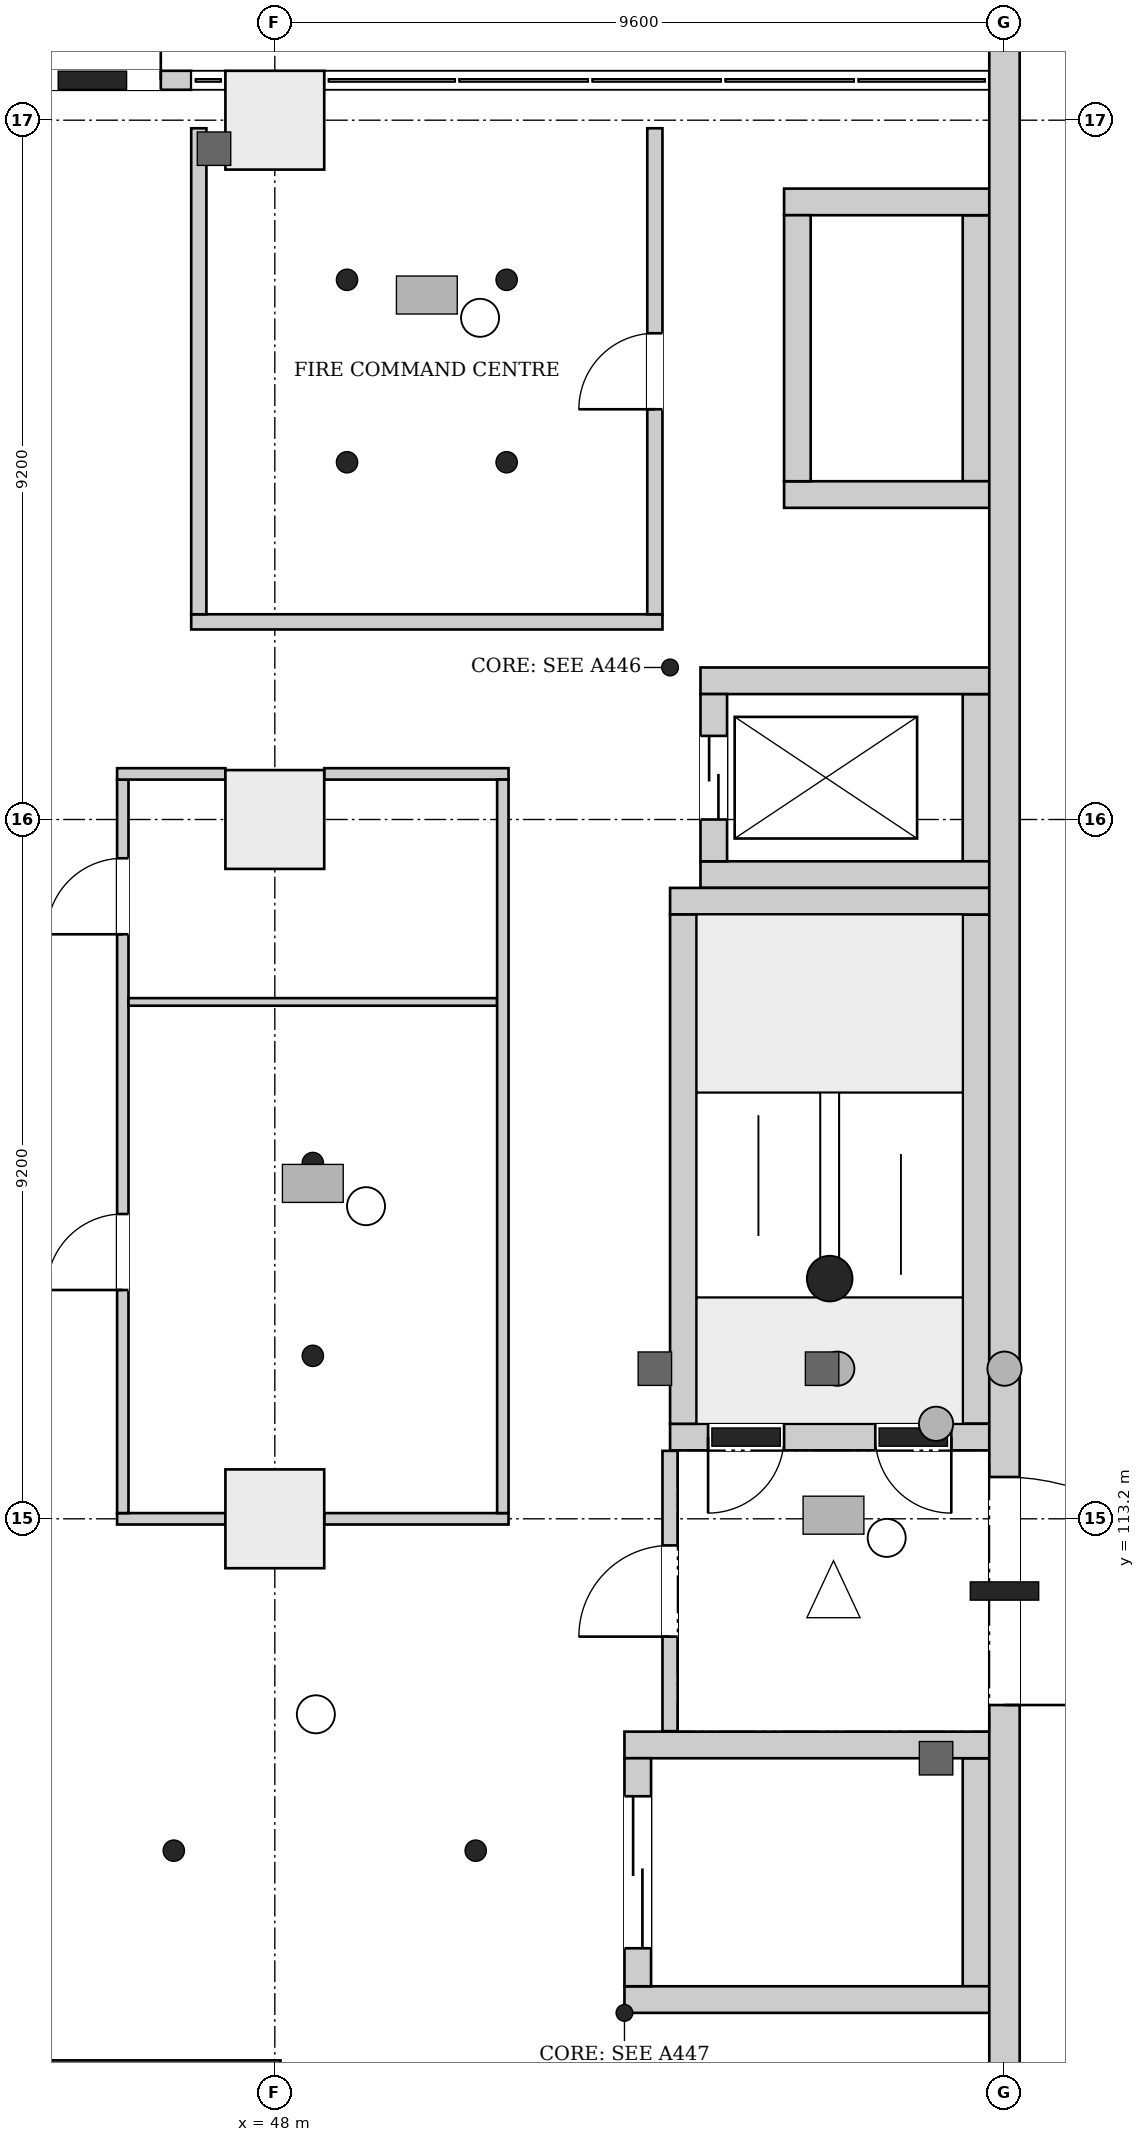
"""IFC4 building model, lengths in metres.
Left out: names, types, materials, properties, quantities, classifications, styles, units other than length and angle.
Written with IfcOpenShell. Run it as: python <this file> out.ifc"""

import sys

from ifc_helpers import new_model, si_unit, direction, frame, frame_2d, origin, origin_2d, place, context, subcontext, project, spatial, rectangle, extrude, element, fill, save


model = new_model("IFC4")
c1 = context("Model", 3, precision=1e-05, world=origin(), true_north=direction((0.0, 1.0)))
c2 = subcontext(c1, "Body", "Model", "MODEL_VIEW")
j1 = project(units=[si_unit("LENGTHUNIT", "METRE"), si_unit("PLANEANGLEUNIT", "RADIAN")], contexts=[c1])
p1 = place(None, origin())
s1 = spatial("IfcSite", under=j1, at=p1, CompositionType="ELEMENT")
p2 = place(p1, origin())
s2 = spatial("IfcBuilding", under=s1, at=p2, CompositionType="ELEMENT")
p3 = place(p2, origin())
s3 = spatial("IfcBuildingStorey", under=s2, at=p3, CompositionType="ELEMENT", Elevation=0.0)
p4 = place(p3, frame((57.6, 94.12, 0.0), z_axis=(0.0, 0.0, 1.0), x_axis=(0.0, 1.0, 0.0)))
e1 = element("IfcWall", 1, at=p4, inside=s3, PredefinedType="SHEAR", context=c2, shape_type="SweptSolid", body=[
    extrude(rectangle(XDim=46.88, YDim=0.4, at=frame_2d((23.44, 0.0))), origin(), (0.0, 0.0, 1.0), 6.5),
])
p5 = place(p4, frame((16.63, 0.0, 0.0)))
e2 = element("IfcOpeningElement", 2, at=p5, cuts=e1, PredefinedType="OPENING", context=c2, shape_type="SweptSolid", body=[
    extrude(rectangle(XDim=3.0, YDim=2.4, at=frame_2d((1.5, 1.2))), frame((0.0, 0.21, 0.0), z_axis=(0.0, -1.0, 0.0), x_axis=(1.0, 0.0, 0.0)), (0.0, 0.0, 1.0), 0.42),
])
p6 = place(p3, frame((53.2, 114.275, 0.0), z_axis=(0.0, 0.0, 1.0), x_axis=(1.0, 0.0, 0.0)))
e3 = element("IfcWall", 3, at=p6, inside=s3, PredefinedType="SHEAR", context=c2, shape_type="SweptSolid", body=[
    extrude(rectangle(XDim=4.2, YDim=0.35, at=frame_2d((2.1, 0.0))), origin(), (0.0, 0.0, 1.0), 6.5),
])
p7 = place(p6, frame((0.5, 0.0, 0.0)))
e4 = element("IfcOpeningElement", 4, at=p7, cuts=e3, PredefinedType="OPENING", context=c2, shape_type="SweptSolid", body=[
    extrude(rectangle(XDim=1.0, YDim=2.1, at=frame_2d((0.5, 1.05))), frame((0.0, 0.185, 0.0), z_axis=(0.0, -1.0, 0.0), x_axis=(1.0, 0.0, 0.0)), (0.0, 0.0, 1.0), 0.37),
])
p8 = place(p6, frame((2.7, 0.0, 0.0)))
e5 = element("IfcOpeningElement", 5, at=p8, cuts=e3, PredefinedType="OPENING", context=c2, shape_type="SweptSolid", body=[
    extrude(rectangle(XDim=1.0, YDim=2.1, at=frame_2d((0.5, 1.05))), frame((0.0, 0.185, 0.0), z_axis=(0.0, -1.0, 0.0), x_axis=(1.0, 0.0, 0.0)), (0.0, 0.0, 1.0), 0.37),
])
p9 = place(p3, frame((53.2, 121.325, 0.0), z_axis=(0.0, 0.0, 1.0), x_axis=(1.0, 0.0, 0.0)))
e6 = element("IfcWall", 6, at=p9, inside=s3, PredefinedType="SHEAR", context=c2, shape_type="SweptSolid", body=[
    extrude(rectangle(XDim=4.2, YDim=0.35, at=frame_2d((2.1, 0.0))), origin(), (0.0, 0.0, 1.0), 6.5),
])
for number, where, z_axis, x_axis in (
    (7, (53.375, 114.45, 0.0), (0.0, 0.0, 1.0), (0.0, 1.0, 0.0)),
    (8, (57.225, 114.45, 0.0), (0.0, 0.0, 1.0), (0.0, 1.0, 0.0)),
):
    element("IfcWall", number, at=place(p3, frame(where, z_axis=z_axis, x_axis=x_axis)), inside=s3, PredefinedType="SHEAR", context=c2, shape_type="SweptSolid", body=[
        extrude(rectangle(XDim=6.7, YDim=0.35, at=frame_2d((3.35, 0.0))), origin(), (0.0, 0.0, 1.0), 6.5),
    ])
for number, where, z_axis, x_axis in (
    (9, (53.6, 121.675, 0.0), (0.0, 0.0, 1.0), (1.0, 0.0, 0.0)),
    (10, (53.6, 124.225, 0.0), (0.0, 0.0, 1.0), (1.0, 0.0, 0.0)),
):
    element("IfcWall", number, at=place(p3, frame(where, z_axis=z_axis, x_axis=x_axis)), inside=s3, PredefinedType="SHEAR", context=c2, shape_type="SweptSolid", body=[
        extrude(rectangle(XDim=3.8, YDim=0.35, at=frame_2d((1.9, 0.0))), origin(), (0.0, 0.0, 1.0), 6.5),
    ])
p10 = place(p3, frame((53.775, 121.85, 0.0), z_axis=(0.0, 0.0, 1.0), x_axis=(0.0, 1.0, 0.0)))
e11 = element("IfcWall", 11, at=p10, inside=s3, PredefinedType="SHEAR", context=c2, shape_type="SweptSolid", body=[
    extrude(rectangle(XDim=2.2, YDim=0.35, at=frame_2d((1.1, 0.0))), origin(), (0.0, 0.0, 1.0), 6.5),
])
p11 = place(p10, frame((0.55, 0.0, 0.0)))
e12 = element("IfcOpeningElement", 12, at=p11, cuts=e11, PredefinedType="OPENING", context=c2, shape_type="SweptSolid", body=[
    extrude(rectangle(XDim=1.1, YDim=2.1, at=frame_2d((0.55, 1.05))), frame((0.0, 0.185, 0.0), z_axis=(0.0, -1.0, 0.0), x_axis=(1.0, 0.0, 0.0)), (0.0, 0.0, 1.0), 0.37),
])
p12 = place(p3, frame((57.225, 121.85, 0.0), z_axis=(0.0, 0.0, 1.0), x_axis=(0.0, 1.0, 0.0)))
e13 = element("IfcWall", 13, at=p12, inside=s3, PredefinedType="SHEAR", context=c2, shape_type="SweptSolid", body=[
    extrude(rectangle(XDim=2.2, YDim=0.35, at=frame_2d((1.1, 0.0))), origin(), (0.0, 0.0, 1.0), 6.5),
])
for number, where, z_axis, x_axis in (
    (14, (52.6, 106.875, 0.0), (0.0, 0.0, 1.0), (1.0, 0.0, 0.0)),
    (15, (52.6, 110.225, 0.0), (0.0, 0.0, 1.0), (1.0, 0.0, 0.0)),
):
    element("IfcWall", number, at=place(p3, frame(where, z_axis=z_axis, x_axis=x_axis)), inside=s3, PredefinedType="SHEAR", context=c2, shape_type="SweptSolid", body=[
        extrude(rectangle(XDim=4.8, YDim=0.35, at=frame_2d((2.4, 0.0))), origin(), (0.0, 0.0, 1.0), 6.5),
    ])
p13 = place(p3, frame((52.775, 107.05, 0.0), z_axis=(0.0, 0.0, 1.0), x_axis=(0.0, 1.0, 0.0)))
e16 = element("IfcWall", 16, at=p13, inside=s3, PredefinedType="SHEAR", context=c2, shape_type="SweptSolid", body=[
    extrude(rectangle(XDim=3.0, YDim=0.35, at=frame_2d((1.5, 0.0))), origin(), (0.0, 0.0, 1.0), 6.5),
])
p14 = place(p13, frame((0.5, 0.0, 0.0)))
e17 = element("IfcOpeningElement", 17, at=p14, cuts=e16, PredefinedType="OPENING", context=c2, shape_type="SweptSolid", body=[
    extrude(rectangle(XDim=2.0, YDim=2.4, at=frame_2d((1.0, 1.2))), frame((0.0, 0.185, 0.0), z_axis=(0.0, -1.0, 0.0), x_axis=(1.0, 0.0, 0.0)), (0.0, 0.0, 1.0), 0.37),
])
p15 = place(p3, frame((57.225, 107.05, 0.0), z_axis=(0.0, 0.0, 1.0), x_axis=(0.0, 1.0, 0.0)))
e18 = element("IfcWall", 18, at=p15, inside=s3, PredefinedType="SHEAR", context=c2, shape_type="SweptSolid", body=[
    extrude(rectangle(XDim=3.0, YDim=0.35, at=frame_2d((1.5, 0.0))), origin(), (0.0, 0.0, 1.0), 6.5),
])
for number, where, z_axis, x_axis in (
    (19, (54.7, 126.675, 0.0), (0.0, 0.0, 1.0), (1.0, 0.0, 0.0)),
    (20, (54.7, 130.525, 0.0), (0.0, 0.0, 1.0), (1.0, 0.0, 0.0)),
):
    element("IfcWall", number, at=place(p3, frame(where, z_axis=z_axis, x_axis=x_axis)), inside=s3, PredefinedType="SHEAR", context=c2, shape_type="SweptSolid", body=[
        extrude(rectangle(XDim=2.7, YDim=0.35, at=frame_2d((1.35, 0.0))), origin(), (0.0, 0.0, 1.0), 6.5),
    ])
for number, where, z_axis, x_axis in (
    (21, (54.875, 126.85, 0.0), (0.0, 0.0, 1.0), (0.0, 1.0, 0.0)),
    (22, (57.225, 126.85, 0.0), (0.0, 0.0, 1.0), (0.0, 1.0, 0.0)),
):
    element("IfcWall", number, at=place(p3, frame(where, z_axis=z_axis, x_axis=x_axis)), inside=s3, PredefinedType="SHEAR", context=c2, shape_type="SweptSolid", body=[
        extrude(rectangle(XDim=3.5, YDim=0.35, at=frame_2d((1.75, 0.0))), origin(), (0.0, 0.0, 1.0), 6.5),
    ])
for number, where, z_axis, x_axis in (
    (23, (48.0, 113.2, 0.0), (0.0, 0.0, 1.0), (1.0, 0.0, 0.0)),
    (24, (48.0, 122.4, 0.0), (0.0, 0.0, 1.0), (1.0, 0.0, 0.0)),
    (25, (48.0, 131.6, 0.0), (0.0, 0.0, 1.0), (1.0, 0.0, 0.0)),
):
    element("IfcColumn", number, at=place(p3, frame(where, z_axis=z_axis, x_axis=x_axis)), inside=s3, PredefinedType="COLUMN", context=c2, shape_type="SweptSolid", body=[
        extrude(rectangle(XDim=1.3, YDim=1.3, at=origin_2d()), origin(), (0.0, 0.0, 1.0), 6.5),
    ])
p16 = place(p3, frame((46.9, 132.125, 0.0), z_axis=(0.0, 0.0, 1.0), x_axis=(-1.0, 0.0, 0.0)))
e26 = element("IfcWall", 26, at=p16, inside=s3, PredefinedType="ELEMENTEDWALL", context=c2, shape_type="SweptSolid", body=[
    extrude(rectangle(XDim=2.6, YDim=0.25, at=frame_2d((1.3, 0.0))), origin(), (0.0, 0.0, 1.0), 5.75),
])
p17 = place(p16, frame((0.4, 0.0, 0.0)))
e27 = element("IfcOpeningElement", 27, at=p17, cuts=e26, PredefinedType="OPENING", context=c2, shape_type="SweptSolid", body=[
    extrude(rectangle(XDim=1.8, YDim=2.4, at=frame_2d((0.9, 1.2))), frame((0.0, 0.135, 0.0), z_axis=(0.0, -1.0, 0.0), x_axis=(1.0, 0.0, 0.0)), (0.0, 0.0, 1.0), 0.27),
])
p18 = place(p3, frame((38.5, 106.0, 0.0), z_axis=(0.0, 0.0, 1.0), x_axis=(1.0, 0.0, 0.0)))
e28 = element("IfcWall", 28, at=p18, inside=s3, PredefinedType="PARTITIONING", context=c2, shape_type="SweptSolid", body=[
    extrude(rectangle(XDim=9.575, YDim=0.15, at=frame_2d((4.788, 0.0))), origin(), (0.0, 0.0, 1.0), 6.15),
])
p19 = place(p3, frame((45.925, 113.2, 0.0), z_axis=(0.0, 0.0, 1.0), x_axis=(1.0, 0.0, 0.0)))
e29 = element("IfcWall", 29, at=p19, inside=s3, PredefinedType="PARTITIONING", context=c2, shape_type="SweptSolid", body=[
    extrude(rectangle(XDim=1.425, YDim=0.15, at=frame_2d((0.712, 0.0))), origin(), (0.0, 0.0, 1.0), 5.75),
])
p20 = place(p3, frame((46.0, 113.275, 0.0), z_axis=(0.0, 0.0, 1.0), x_axis=(0.0, 1.0, 0.0)))
e30 = element("IfcWall", 30, at=p20, inside=s3, PredefinedType="PARTITIONING", context=c2, shape_type="SweptSolid", body=[
    extrude(rectangle(XDim=9.65, YDim=0.15, at=frame_2d((4.825, 0.0))), origin(), (0.0, 0.0, 1.0), 6.15),
])
p21 = place(p20, frame((2.935, 0.0, 0.0)))
e31 = element("IfcOpeningElement", 31, at=p21, cuts=e30, PredefinedType="OPENING", context=c2, shape_type="SweptSolid", body=[
    extrude(rectangle(XDim=1.0, YDim=2.1, at=frame_2d((0.5, 1.05))), frame((0.0, 0.085, 0.0), z_axis=(0.0, -1.0, 0.0), x_axis=(1.0, 0.0, 0.0)), (0.0, 0.0, 1.0), 0.17),
])
p22 = place(p20, frame((7.615, 0.0, 0.0)))
e32 = element("IfcOpeningElement", 32, at=p22, cuts=e30, PredefinedType="OPENING", context=c2, shape_type="SweptSolid", body=[
    extrude(rectangle(XDim=1.0, YDim=2.1, at=frame_2d((0.5, 1.05))), frame((0.0, 0.085, 0.0), z_axis=(0.0, -1.0, 0.0), x_axis=(1.0, 0.0, 0.0)), (0.0, 0.0, 1.0), 0.17),
])
p23 = place(p3, frame((45.925, 123.0, 0.0), z_axis=(0.0, 0.0, 1.0), x_axis=(1.0, 0.0, 0.0)))
e33 = element("IfcWall", 33, at=p23, inside=s3, PredefinedType="PARTITIONING", context=c2, shape_type="SweptSolid", body=[
    extrude(rectangle(XDim=1.425, YDim=0.15, at=frame_2d((0.712, 0.0))), origin(), (0.0, 0.0, 1.0), 5.75),
])
p24 = place(p3, frame((46.075, 120.0, 0.0), z_axis=(0.0, 0.0, 1.0), x_axis=(1.0, 0.0, 0.0)))
e34 = element("IfcWall", 34, at=p24, inside=s3, PredefinedType="PARTITIONING", context=c2, shape_type="SweptSolid", body=[
    extrude(rectangle(XDim=4.85, YDim=0.1, at=frame_2d((2.425, 0.0))), origin(), (0.0, 0.0, 1.0), 6.15),
])
p25 = place(p3, frame((46.9, 125.0, 0.0), z_axis=(0.0, 0.0, 1.0), x_axis=(1.0, 0.0, 0.0)))
e35 = element("IfcWall", 35, at=p25, inside=s3, PredefinedType="PARTITIONING", context=c2, shape_type="SweptSolid", body=[
    extrude(rectangle(XDim=6.2, YDim=0.2, at=frame_2d((3.1, 0.0))), origin(), (0.0, 0.0, 1.0), 6.15),
])
p26 = place(p3, frame((47.0, 125.1, 0.0), z_axis=(0.0, 0.0, 1.0), x_axis=(0.0, 1.0, 0.0)))
e36 = element("IfcWall", 36, at=p26, inside=s3, PredefinedType="PARTITIONING", context=c2, shape_type="SweptSolid", body=[
    extrude(rectangle(XDim=6.394, YDim=0.2, at=frame_2d((3.197, 0.0))), origin(), (0.0, 0.0, 1.0), 6.15),
])
p27 = place(p3, frame((48.65, 113.2, 0.0), z_axis=(0.0, 0.0, 1.0), x_axis=(1.0, 0.0, 0.0)))
e37 = element("IfcWall", 37, at=p27, inside=s3, PredefinedType="PARTITIONING", context=c2, shape_type="SweptSolid", body=[
    extrude(rectangle(XDim=2.425, YDim=0.15, at=frame_2d((1.212, 0.0))), origin(), (0.0, 0.0, 1.0), 5.75),
])
p28 = place(p3, frame((48.65, 123.0, 0.0), z_axis=(0.0, 0.0, 1.0), x_axis=(1.0, 0.0, 0.0)))
e38 = element("IfcWall", 38, at=p28, inside=s3, PredefinedType="PARTITIONING", context=c2, shape_type="SweptSolid", body=[
    extrude(rectangle(XDim=2.425, YDim=0.15, at=frame_2d((1.212, 0.0))), origin(), (0.0, 0.0, 1.0), 6.15),
])
p29 = place(p3, frame((51.0, 113.275, 0.0), z_axis=(0.0, 0.0, 1.0), x_axis=(0.0, 1.0, 0.0)))
e39 = element("IfcWall", 39, at=p29, inside=s3, PredefinedType="PARTITIONING", context=c2, shape_type="SweptSolid", body=[
    extrude(rectangle(XDim=9.65, YDim=0.15, at=frame_2d((4.825, 0.0))), origin(), (0.0, 0.0, 1.0), 6.15),
])
p30 = place(p3, frame((53.0, 125.1, 0.0), z_axis=(0.0, 0.0, 1.0), x_axis=(0.0, 1.0, 0.0)))
e40 = element("IfcWall", 40, at=p30, inside=s3, PredefinedType="PARTITIONING", context=c2, shape_type="SweptSolid", body=[
    extrude(rectangle(XDim=6.394, YDim=0.2, at=frame_2d((3.197, 0.0))), origin(), (0.0, 0.0, 1.0), 6.15),
])
p31 = place(p30, frame((2.697, 0.0, 0.0)))
e41 = element("IfcOpeningElement", 41, at=p31, cuts=e40, PredefinedType="OPENING", context=c2, shape_type="SweptSolid", body=[
    extrude(rectangle(XDim=1.0, YDim=2.1, at=frame_2d((0.5, 1.05))), frame((0.0, 0.11, 0.0), z_axis=(0.0, -1.0, 0.0), x_axis=(1.0, 0.0, 0.0)), (0.0, 0.0, 1.0), 0.22),
])
p32 = place(p3, frame((53.2, 110.406, 0.0), z_axis=(0.0, 0.0, 1.0), x_axis=(0.0, 1.0, 0.0)))
e42 = element("IfcWall", 42, at=p32, inside=s3, PredefinedType="PARTITIONING", context=c2, shape_type="SweptSolid", body=[
    extrude(rectangle(XDim=3.688, YDim=0.2, at=frame_2d((1.844, 0.0))), origin(), (0.0, 0.0, 1.0), 6.15),
])
p33 = place(p32, frame((1.244, 0.0, 0.0)))
e43 = element("IfcOpeningElement", 43, at=p33, cuts=e42, PredefinedType="OPENING", context=c2, shape_type="SweptSolid", body=[
    extrude(rectangle(XDim=1.2, YDim=2.1, at=frame_2d((0.6, 1.05))), frame((0.0, 0.11, 0.0), z_axis=(0.0, -1.0, 0.0), x_axis=(1.0, 0.0, 0.0)), (0.0, 0.0, 1.0), 0.22),
])
p34 = place(p17, frame((1.8, 0.0, 0.0), z_axis=(0.0, 0.0, 1.0), x_axis=(-1.0, 0.0, 0.0)))
e44 = element("IfcDoor", 44, at=p34, inside=s3, OperationType="DOUBLE_DOOR_SINGLE_SWING", PredefinedType="DOOR", context=c2, shape_type="SweptSolid", body=[
    extrude(rectangle(XDim=1.8, YDim=2.4, at=frame_2d((0.9, 1.2))), frame((0.0, 0.025, 0.0), z_axis=(0.0, -1.0, 0.0), x_axis=(1.0, 0.0, 0.0)), (0.0, 0.0, 1.0), 0.05),
])
fill(e27, e44)
p35 = place(p5, frame((3.0, 0.0, 0.0), z_axis=(0.0, 0.0, 1.0), x_axis=(-1.0, 0.0, 0.0)))
e45 = element("IfcDoor", 45, at=p35, inside=s3, OperationType="DOUBLE_DOOR_SINGLE_SWING", PredefinedType="DOOR", context=c2, shape_type="SweptSolid", body=[
    extrude(rectangle(XDim=3.0, YDim=2.4, at=frame_2d((1.5, 1.2))), frame((0.0, 0.025, 0.0), z_axis=(0.0, -1.0, 0.0), x_axis=(1.0, 0.0, 0.0)), (0.0, 0.0, 1.0), 0.05),
])
fill(e2, e45)
p36 = place(p7, origin())
e46 = element("IfcDoor", 46, at=p36, inside=s3, OperationType="SINGLE_SWING_LEFT", PredefinedType="DOOR", context=c2, shape_type="SweptSolid", body=[
    extrude(rectangle(XDim=1.0, YDim=2.1, at=frame_2d((0.5, 1.05))), frame((0.0, 0.025, 0.0), z_axis=(0.0, -1.0, 0.0), x_axis=(1.0, 0.0, 0.0)), (0.0, 0.0, 1.0), 0.05),
])
fill(e4, e46)
p37 = place(p8, origin())
e47 = element("IfcDoor", 47, at=p37, inside=s3, OperationType="SINGLE_SWING_RIGHT", PredefinedType="DOOR", context=c2, shape_type="SweptSolid", body=[
    extrude(rectangle(XDim=1.0, YDim=2.1, at=frame_2d((0.5, 1.05))), frame((0.0, 0.025, 0.0), z_axis=(0.0, -1.0, 0.0), x_axis=(1.0, 0.0, 0.0)), (0.0, 0.0, 1.0), 0.05),
])
fill(e5, e47)
p38 = place(p11, origin())
e48 = element("IfcDoor", 48, at=p38, inside=s3, OperationType="DOUBLE_DOOR_SLIDING", PredefinedType="DOOR", context=c2, shape_type="SweptSolid", body=[
    extrude(rectangle(XDim=1.1, YDim=2.1, at=frame_2d((0.55, 1.05))), frame((0.0, 0.025, 0.0), z_axis=(0.0, -1.0, 0.0), x_axis=(1.0, 0.0, 0.0)), (0.0, 0.0, 1.0), 0.05),
])
fill(e12, e48)
p39 = place(p14, origin())
e49 = element("IfcDoor", 49, at=p39, inside=s3, OperationType="DOUBLE_DOOR_SLIDING", PredefinedType="DOOR", context=c2, shape_type="SweptSolid", body=[
    extrude(rectangle(XDim=2.0, YDim=2.4, at=frame_2d((1.0, 1.2))), frame((0.0, 0.025, 0.0), z_axis=(0.0, -1.0, 0.0), x_axis=(1.0, 0.0, 0.0)), (0.0, 0.0, 1.0), 0.05),
])
fill(e17, e49)
p40 = place(p21, origin())
e50 = element("IfcDoor", 50, at=p40, inside=s3, OperationType="SINGLE_SWING_RIGHT", PredefinedType="DOOR", context=c2, shape_type="SweptSolid", body=[
    extrude(rectangle(XDim=1.0, YDim=2.1, at=frame_2d((0.5, 1.05))), frame((0.0, 0.025, 0.0), z_axis=(0.0, -1.0, 0.0), x_axis=(1.0, 0.0, 0.0)), (0.0, 0.0, 1.0), 0.05),
])
fill(e31, e50)
p41 = place(p22, origin())
e51 = element("IfcDoor", 51, at=p41, inside=s3, OperationType="SINGLE_SWING_LEFT", PredefinedType="DOOR", context=c2, shape_type="SweptSolid", body=[
    extrude(rectangle(XDim=1.0, YDim=2.1, at=frame_2d((0.5, 1.05))), frame((0.0, 0.025, 0.0), z_axis=(0.0, -1.0, 0.0), x_axis=(1.0, 0.0, 0.0)), (0.0, 0.0, 1.0), 0.05),
])
fill(e32, e51)
p42 = place(p31, origin())
e52 = element("IfcDoor", 52, at=p42, inside=s3, OperationType="SINGLE_SWING_LEFT", PredefinedType="DOOR", context=c2, shape_type="SweptSolid", body=[
    extrude(rectangle(XDim=1.0, YDim=2.1, at=frame_2d((0.5, 1.05))), frame((0.0, 0.025, 0.0), z_axis=(0.0, -1.0, 0.0), x_axis=(1.0, 0.0, 0.0)), (0.0, 0.0, 1.0), 0.05),
])
fill(e41, e52)
p43 = place(p33, origin())
e53 = element("IfcDoor", 53, at=p43, inside=s3, OperationType="SINGLE_SWING_RIGHT", PredefinedType="DOOR", context=c2, shape_type="SweptSolid", body=[
    extrude(rectangle(XDim=1.2, YDim=2.1, at=frame_2d((0.6, 1.05))), frame((0.0, 0.025, 0.0), z_axis=(0.0, -1.0, 0.0), x_axis=(1.0, 0.0, 0.0)), (0.0, 0.0, 1.0), 0.05),
])
fill(e43, e53)
save(model, sys.argv[1])
